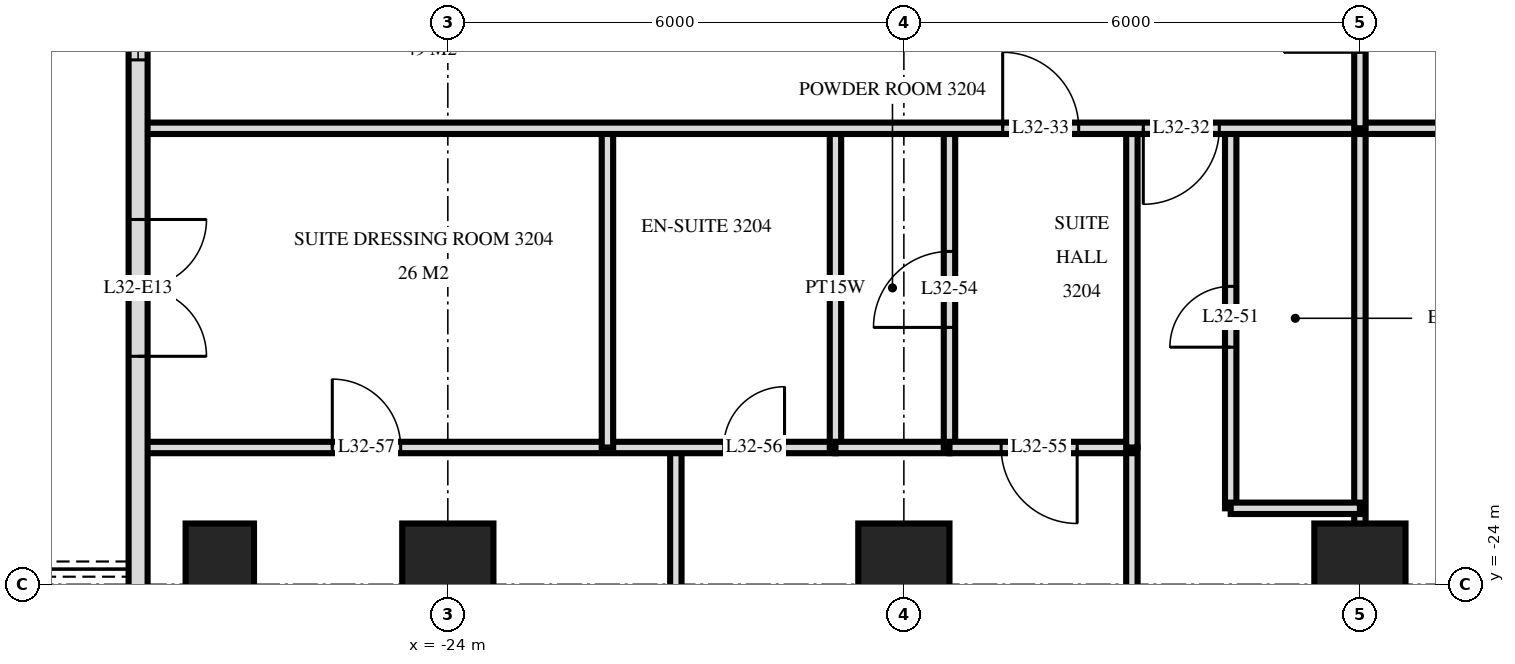
"""IFC4 building model, lengths in metres.
Left out: names, types, materials, properties, quantities, classifications, styles, units other than length and angle.
Written with IfcOpenShell. Run it as: python <this file> out.ifc"""

import sys

from ifc_helpers import new_model, si_unit, direction, frame, frame_2d, origin, origin_2d, place, context, subcontext, project, spatial, rectangle, extrude, element, fill, save


model = new_model("IFC4")
c1 = context("Model", 3, precision=1e-05, world=origin(), true_north=direction((0.0, 1.0)))
c2 = subcontext(c1, "Body", "Model", "MODEL_VIEW")
j1 = project(units=[si_unit("LENGTHUNIT", "METRE"), si_unit("PLANEANGLEUNIT", "RADIAN")], contexts=[c1])
p1 = place(None, origin())
s1 = spatial("IfcSite", under=j1, at=p1, CompositionType="ELEMENT")
p2 = place(p1, origin())
s2 = spatial("IfcBuilding", under=s1, at=p2, CompositionType="ELEMENT")
p3 = place(p2, frame((0.0, 0.0, 127.2)))
s3 = spatial("IfcBuildingStorey", under=s2, at=p3, CompositionType="ELEMENT", Elevation=127.2)
p4 = place(p3, frame((-27.0, -23.8, 0.0), z_axis=(0.0, 0.0, 1.0), x_axis=(0.0, 1.0, 0.0)))
e1 = element("IfcColumn", 1, at=p4, inside=s3, PredefinedType="COLUMN", context=c2, shape_type="SweptSolid", body=[
    extrude(rectangle(XDim=1.2, YDim=0.9, at=origin_2d()), origin(), (0.0, 0.0, 1.0), 3.6),
])
for number, where, z_axis, x_axis in (
    (2, (-24.0, -23.8, 0.0), (0.0, 0.0, 1.0), (1.0, 0.0, 0.0)),
    (3, (-18.0, -23.8, 0.0), (0.0, 0.0, 1.0), (1.0, 0.0, 0.0)),
    (4, (-12.0, -23.8, 0.0), (0.0, 0.0, 1.0), (1.0, 0.0, 0.0)),
):
    element("IfcColumn", number, at=place(p3, frame(where, z_axis=z_axis, x_axis=x_axis)), inside=s3, PredefinedType="COLUMN", context=c2, shape_type="SweptSolid", body=[
        extrude(rectangle(XDim=1.2, YDim=1.2, at=origin_2d()), origin(), (0.0, 0.0, 1.0), 3.6),
    ])
p5 = place(p3, frame((-28.075, -3.325, 0.0), z_axis=(0.0, 0.0, 1.0), x_axis=(0.0, -1.0, 0.0)))
e5 = element("IfcWall", 5, at=p5, inside=s3, PredefinedType="SOLIDWALL", context=c2, shape_type="SweptSolid", body=[
    extrude(rectangle(XDim=25.951, YDim=0.25, at=frame_2d((12.975, 0.0))), origin(), (0.0, 0.0, 1.0), 3.32),
])
p6 = place(p5, frame((6.575, 0.0, 0.0)))
e6 = element("IfcOpeningElement", 6, at=p6, cuts=e5, PredefinedType="OPENING", context=c2, shape_type="SweptSolid", body=[
    extrude(rectangle(XDim=1.8, YDim=2.4, at=frame_2d((0.9, 1.2))), frame((0.0, 0.135, 0.0), z_axis=(0.0, -1.0, 0.0), x_axis=(1.0, 0.0, 0.0)), (0.0, 0.0, 1.0), 0.27),
])
p7 = place(p5, frame((9.425, 0.0, 0.3)))
e7 = element("IfcOpeningElement", 7, at=p7, cuts=e5, PredefinedType="OPENING", context=c2, shape_type="SweptSolid", body=[
    extrude(rectangle(XDim=1.8, YDim=2.1, at=frame_2d((0.9, 1.05))), frame((0.0, 0.135, 0.0), z_axis=(0.0, -1.0, 0.0), x_axis=(1.0, 0.0, 0.0)), (0.0, 0.0, 1.0), 0.27),
])
p8 = place(p5, frame((12.575, 0.0, 0.3)))
e8 = element("IfcOpeningElement", 8, at=p8, cuts=e5, PredefinedType="OPENING", context=c2, shape_type="SweptSolid", body=[
    extrude(rectangle(XDim=1.2, YDim=2.1, at=frame_2d((0.6, 1.05))), frame((0.0, 0.135, 0.0), z_axis=(0.0, -1.0, 0.0), x_axis=(1.0, 0.0, 0.0)), (0.0, 0.0, 1.0), 0.27),
])
p9 = place(p5, frame((15.875, 0.0, 0.0)))
e9 = element("IfcOpeningElement", 9, at=p9, cuts=e5, PredefinedType="OPENING", context=c2, shape_type="SweptSolid", body=[
    extrude(rectangle(XDim=1.8, YDim=2.4, at=frame_2d((0.9, 1.2))), frame((0.0, 0.135, 0.0), z_axis=(0.0, -1.0, 0.0), x_axis=(1.0, 0.0, 0.0)), (0.0, 0.0, 1.0), 0.27),
])
p10 = place(p5, frame((21.075, 0.0, 0.0)))
e10 = element("IfcOpeningElement", 10, at=p10, cuts=e5, PredefinedType="OPENING", context=c2, shape_type="SweptSolid", body=[
    extrude(rectangle(XDim=1.8, YDim=2.4, at=frame_2d((0.9, 1.2))), frame((0.0, 0.135, 0.0), z_axis=(0.0, -1.0, 0.0), x_axis=(1.0, 0.0, 0.0)), (0.0, 0.0, 1.0), 0.27),
])
p11 = place(p5, frame((23.825, 0.0, 0.3)))
e11 = element("IfcOpeningElement", 11, at=p11, cuts=e5, PredefinedType="OPENING", context=c2, shape_type="SweptSolid", body=[
    extrude(rectangle(XDim=1.8, YDim=2.1, at=frame_2d((0.9, 1.05))), frame((0.0, 0.135, 0.0), z_axis=(0.0, -1.0, 0.0), x_axis=(1.0, 0.0, 0.0)), (0.0, 0.0, 1.0), 0.27),
])
p12 = place(p3, frame((-12.0, -18.0, 0.0), z_axis=(0.0, 0.0, 1.0), x_axis=(0.0, 1.0, 0.0)))
e12 = element("IfcWall", 12, at=p12, inside=s3, PredefinedType="PARTITIONING", context=c2, shape_type="SweptSolid", body=[
    extrude(rectangle(XDim=2.95, YDim=0.15, at=frame_2d((1.475, 0.0))), origin(), (0.0, 0.0, 1.0), 3.32),
])
p13 = place(p12, frame((1.0, 0.0, 0.0)))
e13 = element("IfcOpeningElement", 13, at=p13, cuts=e12, PredefinedType="OPENING", context=c2, shape_type="SweptSolid", body=[
    extrude(rectangle(XDim=1.0, YDim=2.1, at=frame_2d((0.5, 1.05))), frame((0.0, 0.085, 0.0), z_axis=(0.0, -1.0, 0.0), x_axis=(1.0, 0.0, 0.0)), (0.0, 0.0, 1.0), 0.17),
])
p14 = place(p3, frame((-12.0, -33.62, 0.0), z_axis=(0.0, 0.0, 1.0), x_axis=(0.0, 1.0, 0.0)))
e14 = element("IfcWall", 14, at=p14, inside=s3, PredefinedType="PARTITIONING", context=c2, shape_type="SweptSolid", body=[
    extrude(rectangle(XDim=15.62, YDim=0.15, at=frame_2d((7.81, 0.0))), origin(), (0.0, 0.0, 1.0), 3.32),
])
p15 = place(p3, frame((-13.7, -23.0, 0.0), z_axis=(0.0, 0.0, 1.0), x_axis=(0.0, 1.0, 0.0)))
e15 = element("IfcWall", 15, at=p15, inside=s3, PredefinedType="PARTITIONING", context=c2, shape_type="SweptSolid", body=[
    extrude(rectangle(XDim=5.0, YDim=0.15, at=frame_2d((2.5, 0.0))), origin(), (0.0, 0.0, 1.0), 3.32),
])
p16 = place(p15, frame((2.12, 0.0, 0.0)))
e16 = element("IfcOpeningElement", 16, at=p16, cuts=e15, PredefinedType="OPENING", context=c2, shape_type="SweptSolid", body=[
    extrude(rectangle(XDim=0.8, YDim=2.1, at=frame_2d((0.4, 1.05))), frame((0.0, 0.085, 0.0), z_axis=(0.0, -1.0, 0.0), x_axis=(1.0, 0.0, 0.0)), (0.0, 0.0, 1.0), 0.17),
])
p17 = place(p3, frame((-15.0, -22.2, 0.0), z_axis=(0.0, 0.0, 1.0), x_axis=(0.0, 1.0, 0.0)))
e17 = element("IfcWall", 17, at=p17, inside=s3, PredefinedType="PARTITIONING", context=c2, shape_type="SweptSolid", body=[
    extrude(rectangle(XDim=4.2, YDim=0.15, at=frame_2d((2.1, 0.0))), origin(), (0.0, 0.0, 1.0), 3.32),
])
p18 = place(p3, frame((-15.0, -33.62, 0.0), z_axis=(0.0, 0.0, 1.0), x_axis=(0.0, 1.0, 0.0)))
e18 = element("IfcWall", 18, at=p18, inside=s3, PredefinedType="PARTITIONING", context=c2, shape_type="SweptSolid", body=[
    extrude(rectangle(XDim=11.42, YDim=0.15, at=frame_2d((5.71, 0.0))), origin(), (0.0, 0.0, 1.0), 3.32),
])
p19 = place(p3, frame((-17.4, -22.2, 0.0), z_axis=(0.0, 0.0, 1.0), x_axis=(0.0, 1.0, 0.0)))
e19 = element("IfcWall", 19, at=p19, inside=s3, PredefinedType="PARTITIONING", context=c2, shape_type="SweptSolid", body=[
    extrude(rectangle(XDim=4.2, YDim=0.15, at=frame_2d((2.1, 0.0))), origin(), (0.0, 0.0, 1.0), 3.32),
])
p20 = place(p19, frame((1.58, 0.0, 0.0)))
e20 = element("IfcOpeningElement", 20, at=p20, cuts=e19, PredefinedType="OPENING", context=c2, shape_type="SweptSolid", body=[
    extrude(rectangle(XDim=1.0, YDim=2.1, at=frame_2d((0.5, 1.05))), frame((0.0, 0.085, 0.0), z_axis=(0.0, -1.0, 0.0), x_axis=(1.0, 0.0, 0.0)), (0.0, 0.0, 1.0), 0.17),
])
p21 = place(p3, frame((-18.9, -22.2, 0.0), z_axis=(0.0, 0.0, 1.0), x_axis=(0.0, 1.0, 0.0)))
e21 = element("IfcWall", 21, at=p21, inside=s3, PredefinedType="PLUMBINGWALL", context=c2, shape_type="SweptSolid", body=[
    extrude(rectangle(XDim=4.2, YDim=0.15, at=frame_2d((2.1, 0.0))), origin(), (0.0, 0.0, 1.0), 3.32),
])
p22 = place(p3, frame((-21.0, -33.62, 0.0), z_axis=(0.0, 0.0, 1.0), x_axis=(0.0, 1.0, 0.0)))
e22 = element("IfcWall", 22, at=p22, inside=s3, PredefinedType="PARTITIONING", context=c2, shape_type="SweptSolid", body=[
    extrude(rectangle(XDim=11.42, YDim=0.15, at=frame_2d((5.71, 0.0))), origin(), (0.0, 0.0, 1.0), 3.32),
])
p23 = place(p22, frame((5.17, 0.0, 0.0)))
e23 = element("IfcOpeningElement", 23, at=p23, cuts=e22, PredefinedType="OPENING", context=c2, shape_type="SweptSolid", body=[
    extrude(rectangle(XDim=0.9, YDim=2.1, at=frame_2d((0.45, 1.05))), frame((0.0, 0.085, 0.0), z_axis=(0.0, -1.0, 0.0), x_axis=(1.0, 0.0, 0.0)), (0.0, 0.0, 1.0), 0.17),
])
p24 = place(p3, frame((-21.9, -22.2, 0.0), z_axis=(0.0, 0.0, 1.0), x_axis=(0.0, 1.0, 0.0)))
e24 = element("IfcWall", 24, at=p24, inside=s3, PredefinedType="PARTITIONING", context=c2, shape_type="SweptSolid", body=[
    extrude(rectangle(XDim=4.2, YDim=0.15, at=frame_2d((2.1, 0.0))), origin(), (0.0, 0.0, 1.0), 3.32),
])
p25 = place(p3, frame((-13.7, -23.0, 0.0), z_axis=(0.0, 0.0, 1.0), x_axis=(1.0, 0.0, 0.0)))
e25 = element("IfcWall", 25, at=p25, inside=s3, PredefinedType="PARTITIONING", context=c2, shape_type="SweptSolid", body=[
    extrude(rectangle(XDim=1.7, YDim=0.15, at=frame_2d((0.85, 0.0))), origin(), (0.0, 0.0, 1.0), 3.32),
])
p26 = place(p3, frame((-17.4, -22.2, 0.0), z_axis=(0.0, 0.0, 1.0), x_axis=(1.0, 0.0, 0.0)))
e26 = element("IfcWall", 26, at=p26, inside=s3, PredefinedType="PARTITIONING", context=c2, shape_type="SweptSolid", body=[
    extrude(rectangle(XDim=2.4, YDim=0.15, at=frame_2d((1.2, 0.0))), origin(), (0.0, 0.0, 1.0), 3.32),
])
p27 = place(p26, frame((0.68, 0.0, 0.0)))
e27 = element("IfcOpeningElement", 27, at=p27, cuts=e26, PredefinedType="OPENING", context=c2, shape_type="SweptSolid", body=[
    extrude(rectangle(XDim=1.0, YDim=2.1, at=frame_2d((0.5, 1.05))), frame((0.0, 0.085, 0.0), z_axis=(0.0, -1.0, 0.0), x_axis=(1.0, 0.0, 0.0)), (0.0, 0.0, 1.0), 0.17),
])
p28 = place(p3, frame((-28.02, -22.2, 0.0), z_axis=(0.0, 0.0, 1.0), x_axis=(1.0, 0.0, 0.0)))
e28 = element("IfcWall", 28, at=p28, inside=s3, PredefinedType="PARTITIONING", context=c2, shape_type="SweptSolid", body=[
    extrude(rectangle(XDim=9.12, YDim=0.15, at=frame_2d((4.56, 0.0))), origin(), (0.0, 0.0, 1.0), 3.32),
])
p29 = place(p28, frame((7.65, 0.0, 0.0)))
e29 = element("IfcOpeningElement", 29, at=p29, cuts=e28, PredefinedType="OPENING", context=c2, shape_type="SweptSolid", body=[
    extrude(rectangle(XDim=0.8, YDim=2.1, at=frame_2d((0.4, 1.05))), frame((0.0, 0.085, 0.0), z_axis=(0.0, -1.0, 0.0), x_axis=(1.0, 0.0, 0.0)), (0.0, 0.0, 1.0), 0.17),
])
p30 = place(p28, frame((2.5, 0.0, 0.0)))
e30 = element("IfcOpeningElement", 30, at=p30, cuts=e28, PredefinedType="OPENING", context=c2, shape_type="SweptSolid", body=[
    extrude(rectangle(XDim=0.9, YDim=2.1, at=frame_2d((0.45, 1.05))), frame((0.0, 0.085, 0.0), z_axis=(0.0, -1.0, 0.0), x_axis=(1.0, 0.0, 0.0)), (0.0, 0.0, 1.0), 0.17),
])
p31 = place(p3, frame((-18.9, -22.2, 0.0), z_axis=(0.0, 0.0, 1.0), x_axis=(1.0, 0.0, 0.0)))
e31 = element("IfcWall", 31, at=p31, inside=s3, PredefinedType="PLUMBINGWALL", context=c2, shape_type="SweptSolid", body=[
    extrude(rectangle(XDim=1.5, YDim=0.15, at=frame_2d((0.75, 0.0))), origin(), (0.0, 0.0, 1.0), 3.32),
])
p32 = place(p3, frame((-28.02, -18.0, 0.0), z_axis=(0.0, 0.0, 1.0), x_axis=(1.0, 0.0, 0.0)))
e32 = element("IfcWall", 32, at=p32, inside=s3, PredefinedType="PARTITIONING", context=c2, shape_type="SweptSolid", body=[
    extrude(rectangle(XDim=56.04, YDim=0.15, at=frame_2d((28.02, 0.0))), origin(), (0.0, 0.0, 1.0), 3.32),
])
p33 = place(p32, frame((13.17, 0.0, 0.0)))
e33 = element("IfcOpeningElement", 33, at=p33, cuts=e32, PredefinedType="OPENING", context=c2, shape_type="SweptSolid", body=[
    extrude(rectangle(XDim=1.0, YDim=2.1, at=frame_2d((0.5, 1.05))), frame((0.0, 0.085, 0.0), z_axis=(0.0, -1.0, 0.0), x_axis=(1.0, 0.0, 0.0)), (0.0, 0.0, 1.0), 0.17),
])
p34 = place(p32, frame((11.32, 0.0, 0.0)))
e34 = element("IfcOpeningElement", 34, at=p34, cuts=e32, PredefinedType="OPENING", context=c2, shape_type="SweptSolid", body=[
    extrude(rectangle(XDim=1.0, YDim=2.1, at=frame_2d((0.5, 1.05))), frame((0.0, 0.085, 0.0), z_axis=(0.0, -1.0, 0.0), x_axis=(1.0, 0.0, 0.0)), (0.0, 0.0, 1.0), 0.17),
])
p35 = place(p32, frame((41.87, 0.0, 0.0)))
e35 = element("IfcOpeningElement", 35, at=p35, cuts=e32, PredefinedType="OPENING", context=c2, shape_type="SweptSolid", body=[
    extrude(rectangle(XDim=1.0, YDim=2.1, at=frame_2d((0.5, 1.05))), frame((0.0, 0.085, 0.0), z_axis=(0.0, -1.0, 0.0), x_axis=(1.0, 0.0, 0.0)), (0.0, 0.0, 1.0), 0.17),
])
p36 = place(p32, frame((43.17, 0.0, 0.0)))
e36 = element("IfcOpeningElement", 36, at=p36, cuts=e32, PredefinedType="OPENING", context=c2, shape_type="SweptSolid", body=[
    extrude(rectangle(XDim=1.0, YDim=2.1, at=frame_2d((0.5, 1.05))), frame((0.0, 0.085, 0.0), z_axis=(0.0, -1.0, 0.0), x_axis=(1.0, 0.0, 0.0)), (0.0, 0.0, 1.0), 0.17),
])
p37 = place(p32, frame((46.72, 0.0, 0.0)))
e37 = element("IfcOpeningElement", 37, at=p37, cuts=e32, PredefinedType="OPENING", context=c2, shape_type="SweptSolid", body=[
    extrude(rectangle(XDim=1.0, YDim=2.1, at=frame_2d((0.5, 1.05))), frame((0.0, 0.085, 0.0), z_axis=(0.0, -1.0, 0.0), x_axis=(1.0, 0.0, 0.0)), (0.0, 0.0, 1.0), 0.17),
])
p38 = place(p32, frame((21.52, 0.0, 0.0)))
e38 = element("IfcOpeningElement", 38, at=p38, cuts=e32, PredefinedType="OPENING", context=c2, shape_type="SweptSolid", body=[
    extrude(rectangle(XDim=1.0, YDim=2.1, at=frame_2d((0.5, 1.05))), frame((0.0, 0.085, 0.0), z_axis=(0.0, -1.0, 0.0), x_axis=(1.0, 0.0, 0.0)), (0.0, 0.0, 1.0), 0.17),
])
p39 = place(p32, frame((33.52, 0.0, 0.0)))
e39 = element("IfcOpeningElement", 39, at=p39, cuts=e32, PredefinedType="OPENING", context=c2, shape_type="SweptSolid", body=[
    extrude(rectangle(XDim=1.0, YDim=2.1, at=frame_2d((0.5, 1.05))), frame((0.0, 0.085, 0.0), z_axis=(0.0, -1.0, 0.0), x_axis=(1.0, 0.0, 0.0)), (0.0, 0.0, 1.0), 0.17),
])
p40 = place(p8, origin())
e40 = element("IfcWindow", 40, at=p40, inside=s3, PartitioningType="SINGLE_PANEL", PredefinedType="WINDOW", context=c2, shape_type="SweptSolid", body=[
    extrude(rectangle(XDim=1.2, YDim=2.1, at=frame_2d((0.6, 1.05))), frame((0.0, 0.03, 0.0), z_axis=(0.0, -1.0, 0.0), x_axis=(1.0, 0.0, 0.0)), (0.0, 0.0, 1.0), 0.06),
])
fill(e8, e40)
p41 = place(p9, origin())
e41 = element("IfcDoor", 41, at=p41, inside=s3, OperationType="DOUBLE_DOOR_SINGLE_SWING", PredefinedType="DOOR", context=c2, shape_type="SweptSolid", body=[
    extrude(rectangle(XDim=1.8, YDim=2.4, at=frame_2d((0.9, 1.2))), frame((0.0, 0.025, 0.0), z_axis=(0.0, -1.0, 0.0), x_axis=(1.0, 0.0, 0.0)), (0.0, 0.0, 1.0), 0.05),
])
fill(e9, e41)
p42 = place(p33, frame((0.5, 0.0, 0.0), z_axis=(0.0, 0.0, 1.0), x_axis=(-1.0, 0.0, 0.0)))
e42 = element("IfcDoor", 42, at=p42, inside=s3, OperationType="SINGLE_SWING_LEFT", PredefinedType="DOOR", context=c2, shape_type="SweptSolid", body=[
    extrude(rectangle(XDim=1.0, YDim=2.1, at=frame_2d((0.0, 1.05))), frame((0.0, -0.025, 0.0), z_axis=(0.0, 1.0, 0.0), x_axis=(-1.0, 0.0, 0.0)), (0.0, 0.0, 1.0), 0.05),
])
fill(e33, e42)
p43 = place(p34, origin())
e43 = element("IfcDoor", 43, at=p43, inside=s3, OperationType="SINGLE_SWING_RIGHT", PredefinedType="DOOR", context=c2, shape_type="SweptSolid", body=[
    extrude(rectangle(XDim=1.0, YDim=2.1, at=frame_2d((0.5, 1.05))), frame((0.0, 0.025, 0.0), z_axis=(0.0, -1.0, 0.0), x_axis=(1.0, 0.0, 0.0)), (0.0, 0.0, 1.0), 0.05),
])
fill(e34, e43)
p44 = place(p16, origin())
e44 = element("IfcDoor", 44, at=p44, inside=s3, OperationType="SINGLE_SWING_RIGHT", PredefinedType="DOOR", context=c2, shape_type="SweptSolid", body=[
    extrude(rectangle(XDim=0.8, YDim=2.1, at=frame_2d((0.4, 1.05))), frame((0.0, 0.025, 0.0), z_axis=(0.0, -1.0, 0.0), x_axis=(1.0, 0.0, 0.0)), (0.0, 0.0, 1.0), 0.05),
])
fill(e16, e44)
p45 = place(p20, origin())
e45 = element("IfcDoor", 45, at=p45, inside=s3, OperationType="SINGLE_SWING_RIGHT", PredefinedType="DOOR", context=c2, shape_type="SweptSolid", body=[
    extrude(rectangle(XDim=1.0, YDim=2.1, at=frame_2d((0.5, 1.05))), frame((0.0, 0.025, 0.0), z_axis=(0.0, -1.0, 0.0), x_axis=(1.0, 0.0, 0.0)), (0.0, 0.0, 1.0), 0.05),
])
fill(e20, e45)
p46 = place(p27, frame((0.5, 0.0, 0.0), z_axis=(0.0, 0.0, 1.0), x_axis=(-1.0, 0.0, 0.0)))
e46 = element("IfcDoor", 46, at=p46, inside=s3, OperationType="SINGLE_SWING_RIGHT", PredefinedType="DOOR", context=c2, shape_type="SweptSolid", body=[
    extrude(rectangle(XDim=1.0, YDim=2.1, at=frame_2d((0.0, 1.05))), frame((0.0, -0.025, 0.0), z_axis=(0.0, 1.0, 0.0), x_axis=(-1.0, 0.0, 0.0)), (0.0, 0.0, 1.0), 0.05),
])
fill(e27, e46)
p47 = place(p29, origin())
e47 = element("IfcDoor", 47, at=p47, inside=s3, OperationType="SINGLE_SWING_LEFT", PredefinedType="DOOR", context=c2, shape_type="SweptSolid", body=[
    extrude(rectangle(XDim=0.8, YDim=2.1, at=frame_2d((0.4, 1.05))), frame((0.0, 0.025, 0.0), z_axis=(0.0, -1.0, 0.0), x_axis=(1.0, 0.0, 0.0)), (0.0, 0.0, 1.0), 0.05),
])
fill(e29, e47)
p48 = place(p30, origin())
e48 = element("IfcDoor", 48, at=p48, inside=s3, OperationType="SINGLE_SWING_RIGHT", PredefinedType="DOOR", context=c2, shape_type="SweptSolid", body=[
    extrude(rectangle(XDim=0.9, YDim=2.1, at=frame_2d((0.45, 1.05))), frame((0.0, 0.025, 0.0), z_axis=(0.0, -1.0, 0.0), x_axis=(1.0, 0.0, 0.0)), (0.0, 0.0, 1.0), 0.05),
])
fill(e30, e48)
save(model, sys.argv[1])
